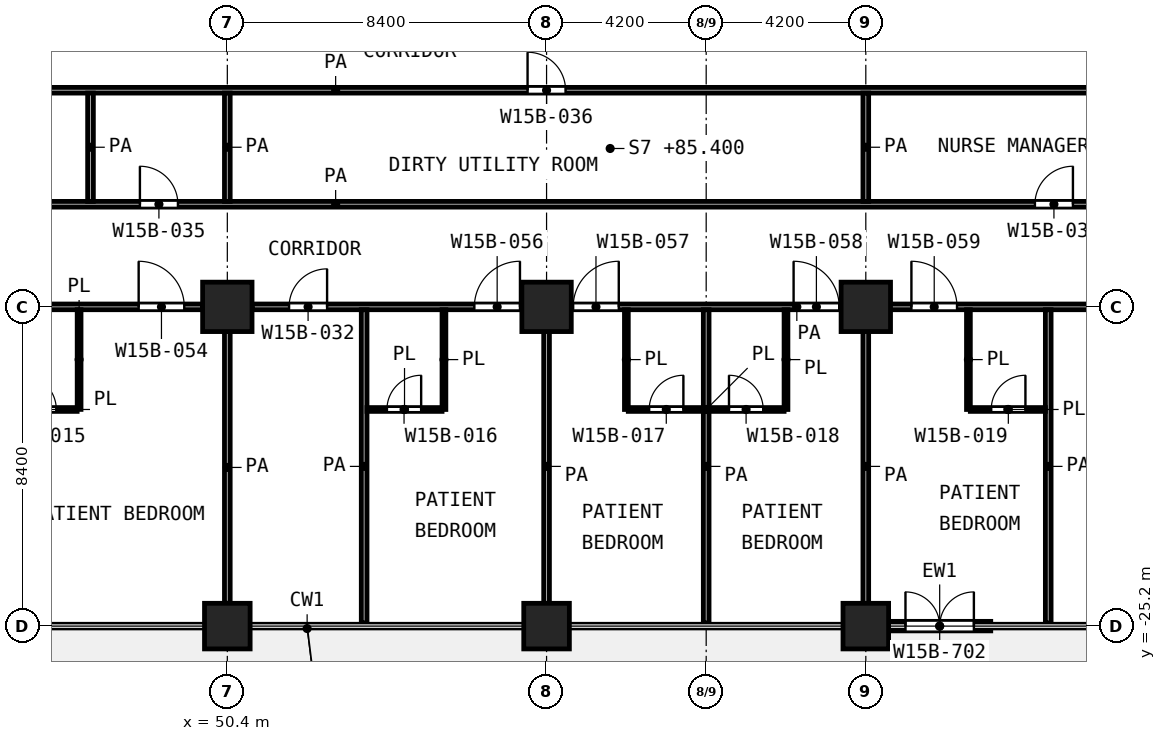
"""IFC4 building model, lengths in metres.
Left out: names, types, materials, properties, quantities, classifications, styles, units other than length and angle.
Written with IfcOpenShell. Run it as: python <this file> out.ifc"""

import sys

from ifc_helpers import new_model, si_unit, direction, frame, frame_2d, origin, origin_2d, place, context, subcontext, project, spatial, rectangle, extrude, element, fill, save


model = new_model("IFC4")
c1 = context("Model", 3, precision=1e-05, world=origin(), true_north=direction((0.0, 1.0)))
c2 = subcontext(c1, "Body", "Model", "MODEL_VIEW")
j1 = project(units=[si_unit("LENGTHUNIT", "METRE"), si_unit("PLANEANGLEUNIT", "RADIAN")], contexts=[c1])
p1 = place(None, origin())
s1 = spatial("IfcSite", under=j1, at=p1, CompositionType="ELEMENT")
p2 = place(p1, origin())
s2 = spatial("IfcBuilding", under=s1, at=p2, CompositionType="ELEMENT")
p3 = place(p2, frame((0.0, 0.0, 85.4)))
s3 = spatial("IfcBuildingStorey", under=s2, at=p3, CompositionType="ELEMENT", Elevation=85.4)
for number, where, z_axis, x_axis in (
    (1, (50.4, -16.8, 0.0), (0.0, 0.0, 1.0), (1.0, 0.0, 0.0)),
    (2, (58.8, -16.8, 0.0), (0.0, 0.0, 1.0), (1.0, 0.0, 0.0)),
    (3, (67.2, -16.8, 0.0), (0.0, 0.0, 1.0), (1.0, 0.0, 0.0)),
):
    element("IfcColumn", number, at=place(p3, frame(where, z_axis=z_axis, x_axis=x_axis)), inside=s3, PredefinedType="COLUMN", context=c2, shape_type="SweptSolid", body=[
        extrude(rectangle(XDim=1.3, YDim=1.3, at=origin_2d()), origin(), (0.0, 0.0, 1.0), 4.2),
    ])
for number, where, z_axis, x_axis in (
    (4, (50.4, -25.2, 0.0), (0.0, 0.0, 1.0), (1.0, 0.0, 0.0)),
    (5, (58.8, -25.2, 0.0), (0.0, 0.0, 1.0), (1.0, 0.0, 0.0)),
    (6, (67.2, -25.2, 0.0), (0.0, 0.0, 1.0), (1.0, 0.0, 0.0)),
):
    element("IfcColumn", number, at=place(p3, frame(where, z_axis=z_axis, x_axis=x_axis)), inside=s3, PredefinedType="COLUMN", context=c2, shape_type="SweptSolid", body=[
        extrude(rectangle(XDim=1.2, YDim=1.2, at=origin_2d()), origin(), (0.0, 0.0, 1.0), 4.2),
    ])
p4 = place(p3, frame((67.8, -25.2, 0.0), z_axis=(0.0, 0.0, 1.0), x_axis=(1.0, 0.0, 0.0)))
e7 = element("IfcWall", 7, at=p4, inside=s3, PredefinedType="SOLIDWALL", context=c2, shape_type="SweptSolid", body=[
    extrude(rectangle(XDim=2.688, YDim=0.25, at=frame_2d((1.344, 0.0))), origin(), (0.0, 0.0, 1.0), 3.78),
])
p5 = place(p4, frame((0.444, 0.0, 0.0)))
e8 = element("IfcOpeningElement", 8, at=p5, cuts=e7, PredefinedType="OPENING", context=c2, shape_type="SweptSolid", body=[
    extrude(rectangle(XDim=1.8, YDim=2.1, at=frame_2d((0.9, 1.05))), frame((0.0, 0.135, 0.0), z_axis=(0.0, -1.0, 0.0), x_axis=(1.0, 0.0, 0.0)), (0.0, 0.0, 1.0), 0.27),
])
p6 = place(p3, frame((44.452, -19.5, 0.0), z_axis=(0.0, 0.0, 1.0), x_axis=(1.0, 0.0, 0.0)))
e9 = element("IfcWall", 9, at=p6, inside=s3, PredefinedType="PARTITIONING", context=c2, shape_type="SweptSolid", body=[
    extrude(rectangle(XDim=1.996, YDim=0.1, at=frame_2d((0.998, 0.0))), origin(), (0.0, 0.0, 1.0), 3.9),
])
p7 = place(p6, frame((0.548, 0.0, 0.0)))
e10 = element("IfcOpeningElement", 10, at=p7, cuts=e9, PredefinedType="OPENING", context=c2, shape_type="SweptSolid", body=[
    extrude(rectangle(XDim=0.9, YDim=2.1, at=frame_2d((0.45, 1.05))), frame((0.0, 0.06, 0.0), z_axis=(0.0, -1.0, 0.0), x_axis=(1.0, 0.0, 0.0)), (0.0, 0.0, 1.0), 0.12),
])
p8 = place(p3, frame((54.075, -19.5, 0.0), z_axis=(0.0, 0.0, 1.0), x_axis=(1.0, 0.0, 0.0)))
e11 = element("IfcWall", 11, at=p8, inside=s3, PredefinedType="PARTITIONING", context=c2, shape_type="SweptSolid", body=[
    extrude(rectangle(XDim=1.975, YDim=0.1, at=frame_2d((0.988, 0.0))), origin(), (0.0, 0.0, 1.0), 3.9),
])
p9 = place(p8, frame((0.525, 0.0, 0.0)))
e12 = element("IfcOpeningElement", 12, at=p9, cuts=e11, PredefinedType="OPENING", context=c2, shape_type="SweptSolid", body=[
    extrude(rectangle(XDim=0.9, YDim=2.1, at=frame_2d((0.45, 1.05))), frame((0.0, 0.06, 0.0), z_axis=(0.0, -1.0, 0.0), x_axis=(1.0, 0.0, 0.0)), (0.0, 0.0, 1.0), 0.12),
])
p10 = place(p3, frame((60.95, -19.5, 0.0), z_axis=(0.0, 0.0, 1.0), x_axis=(1.0, 0.0, 0.0)))
e13 = element("IfcWall", 13, at=p10, inside=s3, PredefinedType="PARTITIONING", context=c2, shape_type="SweptSolid", body=[
    extrude(rectangle(XDim=4.1, YDim=0.1, at=frame_2d((2.05, 0.0))), origin(), (0.0, 0.0, 1.0), 3.9),
])
p11 = place(p10, frame((0.55, 0.0, 0.0)))
e14 = element("IfcOpeningElement", 14, at=p11, cuts=e13, PredefinedType="OPENING", context=c2, shape_type="SweptSolid", body=[
    extrude(rectangle(XDim=0.9, YDim=2.1, at=frame_2d((0.45, 1.05))), frame((0.0, 0.06, 0.0), z_axis=(0.0, -1.0, 0.0), x_axis=(1.0, 0.0, 0.0)), (0.0, 0.0, 1.0), 0.12),
])
p12 = place(p10, frame((2.65, 0.0, 0.0)))
e15 = element("IfcOpeningElement", 15, at=p12, cuts=e13, PredefinedType="OPENING", context=c2, shape_type="SweptSolid", body=[
    extrude(rectangle(XDim=0.9, YDim=2.1, at=frame_2d((0.45, 1.05))), frame((0.0, 0.06, 0.0), z_axis=(0.0, -1.0, 0.0), x_axis=(1.0, 0.0, 0.0)), (0.0, 0.0, 1.0), 0.12),
])
p13 = place(p3, frame((69.95, -19.5, 0.0), z_axis=(0.0, 0.0, 1.0), x_axis=(1.0, 0.0, 0.0)))
e16 = element("IfcWall", 16, at=p13, inside=s3, PredefinedType="PARTITIONING", context=c2, shape_type="SweptSolid", body=[
    extrude(rectangle(XDim=1.975, YDim=0.1, at=frame_2d((0.988, 0.0))), origin(), (0.0, 0.0, 1.0), 3.9),
])
p14 = place(p13, frame((0.55, 0.0, 0.0)))
e17 = element("IfcOpeningElement", 17, at=p14, cuts=e16, PredefinedType="OPENING", context=c2, shape_type="SweptSolid", body=[
    extrude(rectangle(XDim=0.9, YDim=2.1, at=frame_2d((0.45, 1.05))), frame((0.0, 0.06, 0.0), z_axis=(0.0, -1.0, 0.0), x_axis=(1.0, 0.0, 0.0)), (0.0, 0.0, 1.0), 0.12),
])
p15 = place(p3, frame((46.5, -19.498, 0.0), z_axis=(0.0, 0.0, 1.0), x_axis=(0.0, 1.0, 0.0)))
e18 = element("IfcWall", 18, at=p15, inside=s3, PredefinedType="PARTITIONING", context=c2, shape_type="SweptSolid", body=[
    extrude(rectangle(XDim=2.623, YDim=0.1, at=frame_2d((1.312, 0.0))), origin(), (0.0, 0.0, 1.0), 3.9),
])
for number, where, z_axis, x_axis in (
    (19, (56.1, -19.5, 0.0), (0.0, 0.0, 1.0), (0.0, 1.0, 0.0)),
    (20, (60.9, -19.5, 0.0), (0.0, 0.0, 1.0), (0.0, 1.0, 0.0)),
    (21, (65.1, -19.5, 0.0), (0.0, 0.0, 1.0), (0.0, 1.0, 0.0)),
    (22, (69.9, -19.5, 0.0), (0.0, 0.0, 1.0), (0.0, 1.0, 0.0)),
):
    element("IfcWall", number, at=place(p3, frame(where, z_axis=z_axis, x_axis=x_axis)), inside=s3, PredefinedType="PARTITIONING", context=c2, shape_type="SweptSolid", body=[
        extrude(rectangle(XDim=2.625, YDim=0.1, at=frame_2d((1.312, 0.0))), origin(), (0.0, 0.0, 1.0), 3.9),
    ])
p16 = place(p3, frame((25.1, -16.8, 0.0), z_axis=(0.0, 0.0, 1.0), x_axis=(1.0, 0.0, 0.0)))
e23 = element("IfcWall", 23, at=p16, inside=s3, PredefinedType="PARTITIONING", context=c2, shape_type="SweptSolid", body=[
    extrude(rectangle(XDim=24.65, YDim=0.15, at=frame_2d((12.325, 0.0))), origin(), (0.0, 0.0, 1.0), 3.9),
])
p17 = place(p16, frame((1.45, 0.0, 0.0)))
e24 = element("IfcOpeningElement", 24, at=p17, cuts=e23, PredefinedType="OPENING", context=c2, shape_type="SweptSolid", body=[
    extrude(rectangle(XDim=1.5, YDim=2.1, at=frame_2d((0.75, 1.05))), frame((0.0, 0.085, 0.0), z_axis=(0.0, -1.0, 0.0), x_axis=(1.0, 0.0, 0.0)), (0.0, 0.0, 1.0), 0.17),
])
p18 = place(p16, frame((9.25, 0.0, 0.0)))
e25 = element("IfcOpeningElement", 25, at=p18, cuts=e23, PredefinedType="OPENING", context=c2, shape_type="SweptSolid", body=[
    extrude(rectangle(XDim=1.5, YDim=2.1, at=frame_2d((0.75, 1.05))), frame((0.0, 0.085, 0.0), z_axis=(0.0, -1.0, 0.0), x_axis=(1.0, 0.0, 0.0)), (0.0, 0.0, 1.0), 0.17),
])
p19 = place(p16, frame((15.0, 0.0, 0.0)))
e26 = element("IfcOpeningElement", 26, at=p19, cuts=e23, PredefinedType="OPENING", context=c2, shape_type="SweptSolid", body=[
    extrude(rectangle(XDim=1.2, YDim=2.1, at=frame_2d((0.6, 1.05))), frame((0.0, 0.085, 0.0), z_axis=(0.0, -1.0, 0.0), x_axis=(1.0, 0.0, 0.0)), (0.0, 0.0, 1.0), 0.17),
])
p20 = place(p16, frame((22.967, 0.0, 0.0)))
e27 = element("IfcOpeningElement", 27, at=p20, cuts=e23, PredefinedType="OPENING", context=c2, shape_type="SweptSolid", body=[
    extrude(rectangle(XDim=1.2, YDim=2.1, at=frame_2d((0.6, 1.05))), frame((0.0, 0.085, 0.0), z_axis=(0.0, -1.0, 0.0), x_axis=(1.0, 0.0, 0.0)), (0.0, 0.0, 1.0), 0.17),
])
p21 = place(p16, frame((17.6, 0.0, 0.0)))
e28 = element("IfcOpeningElement", 28, at=p21, cuts=e23, PredefinedType="OPENING", context=c2, shape_type="SweptSolid", body=[
    extrude(rectangle(XDim=1.2, YDim=2.1, at=frame_2d((0.6, 1.05))), frame((0.0, 0.085, 0.0), z_axis=(0.0, -1.0, 0.0), x_axis=(1.0, 0.0, 0.0)), (0.0, 0.0, 1.0), 0.17),
])
p22 = place(p3, frame((51.05, -16.8, 0.0), z_axis=(0.0, 0.0, 1.0), x_axis=(1.0, 0.0, 0.0)))
e29 = element("IfcWall", 29, at=p22, inside=s3, PredefinedType="PARTITIONING", context=c2, shape_type="SweptSolid", body=[
    extrude(rectangle(XDim=28.67, YDim=0.15, at=frame_2d((14.335, 0.0))), origin(), (0.0, 0.0, 1.0), 3.9),
])
p23 = place(p22, frame((0.975, 0.0, 0.0)))
e30 = element("IfcOpeningElement", 30, at=p23, cuts=e29, PredefinedType="OPENING", context=c2, shape_type="SweptSolid", body=[
    extrude(rectangle(XDim=1.0, YDim=2.1, at=frame_2d((0.5, 1.05))), frame((0.0, 0.085, 0.0), z_axis=(0.0, -1.0, 0.0), x_axis=(1.0, 0.0, 0.0)), (0.0, 0.0, 1.0), 0.17),
])
p24 = place(p22, frame((5.85, 0.0, 0.0)))
e31 = element("IfcOpeningElement", 31, at=p24, cuts=e29, PredefinedType="OPENING", context=c2, shape_type="SweptSolid", body=[
    extrude(rectangle(XDim=1.2, YDim=2.1, at=frame_2d((0.6, 1.05))), frame((0.0, 0.085, 0.0), z_axis=(0.0, -1.0, 0.0), x_axis=(1.0, 0.0, 0.0)), (0.0, 0.0, 1.0), 0.17),
])
p25 = place(p22, frame((8.45, 0.0, 0.0)))
e32 = element("IfcOpeningElement", 32, at=p25, cuts=e29, PredefinedType="OPENING", context=c2, shape_type="SweptSolid", body=[
    extrude(rectangle(XDim=1.2, YDim=2.1, at=frame_2d((0.6, 1.05))), frame((0.0, 0.085, 0.0), z_axis=(0.0, -1.0, 0.0), x_axis=(1.0, 0.0, 0.0)), (0.0, 0.0, 1.0), 0.17),
])
p26 = place(p22, frame((14.25, 0.0, 0.0)))
e33 = element("IfcOpeningElement", 33, at=p26, cuts=e29, PredefinedType="OPENING", context=c2, shape_type="SweptSolid", body=[
    extrude(rectangle(XDim=1.2, YDim=2.1, at=frame_2d((0.6, 1.05))), frame((0.0, 0.085, 0.0), z_axis=(0.0, -1.0, 0.0), x_axis=(1.0, 0.0, 0.0)), (0.0, 0.0, 1.0), 0.17),
])
p27 = place(p22, frame((17.35, 0.0, 0.0)))
e34 = element("IfcOpeningElement", 34, at=p27, cuts=e29, PredefinedType="OPENING", context=c2, shape_type="SweptSolid", body=[
    extrude(rectangle(XDim=1.2, YDim=2.1, at=frame_2d((0.6, 1.05))), frame((0.0, 0.085, 0.0), z_axis=(0.0, -1.0, 0.0), x_axis=(1.0, 0.0, 0.0)), (0.0, 0.0, 1.0), 0.17),
])
p28 = place(p22, frame((25.3, 0.0, 0.0)))
e35 = element("IfcOpeningElement", 35, at=p28, cuts=e29, PredefinedType="OPENING", context=c2, shape_type="SweptSolid", body=[
    extrude(rectangle(XDim=1.5, YDim=2.1, at=frame_2d((0.75, 1.05))), frame((0.0, 0.085, 0.0), z_axis=(0.0, -1.0, 0.0), x_axis=(1.0, 0.0, 0.0)), (0.0, 0.0, 1.0), 0.17),
])
p29 = place(p3, frame((29.475, -14.1, 0.0), z_axis=(0.0, 0.0, 1.0), x_axis=(1.0, 0.0, 0.0)))
e36 = element("IfcWall", 36, at=p29, inside=s3, PredefinedType="PARTITIONING", context=c2, shape_type="SweptSolid", body=[
    extrude(rectangle(XDim=47.55, YDim=0.15, at=frame_2d((23.775, 0.0))), origin(), (0.0, 0.0, 1.0), 3.9),
])
p30 = place(p29, frame((18.625, 0.0, 0.0)))
e37 = element("IfcOpeningElement", 37, at=p30, cuts=e36, PredefinedType="OPENING", context=c2, shape_type="SweptSolid", body=[
    extrude(rectangle(XDim=1.0, YDim=2.1, at=frame_2d((0.5, 1.05))), frame((0.0, 0.085, 0.0), z_axis=(0.0, -1.0, 0.0), x_axis=(1.0, 0.0, 0.0)), (0.0, 0.0, 1.0), 0.17),
])
p31 = place(p29, frame((42.175, 0.0, 0.0)))
e38 = element("IfcOpeningElement", 38, at=p31, cuts=e36, PredefinedType="OPENING", context=c2, shape_type="SweptSolid", body=[
    extrude(rectangle(XDim=1.0, YDim=2.1, at=frame_2d((0.5, 1.05))), frame((0.0, 0.085, 0.0), z_axis=(0.0, -1.0, 0.0), x_axis=(1.0, 0.0, 0.0)), (0.0, 0.0, 1.0), 0.17),
])
p32 = place(p3, frame((29.475, -11.1, 0.0), z_axis=(0.0, 0.0, 1.0), x_axis=(1.0, 0.0, 0.0)))
e39 = element("IfcWall", 39, at=p32, inside=s3, PredefinedType="PARTITIONING", context=c2, shape_type="SweptSolid", body=[
    extrude(rectangle(XDim=47.55, YDim=0.15, at=frame_2d((23.775, 0.0))), origin(), (0.0, 0.0, 1.0), 3.9),
])
p33 = place(p32, frame((3.525, 0.0, 0.0)))
e40 = element("IfcOpeningElement", 40, at=p33, cuts=e39, PredefinedType="OPENING", context=c2, shape_type="SweptSolid", body=[
    extrude(rectangle(XDim=1.2, YDim=2.1, at=frame_2d((0.6, 1.05))), frame((0.0, 0.085, 0.0), z_axis=(0.0, -1.0, 0.0), x_axis=(1.0, 0.0, 0.0)), (0.0, 0.0, 1.0), 0.17),
])
p34 = place(p32, frame((9.925, 0.0, 0.0)))
e41 = element("IfcOpeningElement", 41, at=p34, cuts=e39, PredefinedType="OPENING", context=c2, shape_type="SweptSolid", body=[
    extrude(rectangle(XDim=1.0, YDim=2.1, at=frame_2d((0.5, 1.05))), frame((0.0, 0.085, 0.0), z_axis=(0.0, -1.0, 0.0), x_axis=(1.0, 0.0, 0.0)), (0.0, 0.0, 1.0), 0.17),
])
p35 = place(p32, frame((14.425, 0.0, 0.0)))
e42 = element("IfcOpeningElement", 42, at=p35, cuts=e39, PredefinedType="OPENING", context=c2, shape_type="SweptSolid", body=[
    extrude(rectangle(XDim=1.0, YDim=2.1, at=frame_2d((0.5, 1.05))), frame((0.0, 0.085, 0.0), z_axis=(0.0, -1.0, 0.0), x_axis=(1.0, 0.0, 0.0)), (0.0, 0.0, 1.0), 0.17),
])
p36 = place(p32, frame((28.825, 0.0, 0.0)))
e43 = element("IfcOpeningElement", 43, at=p36, cuts=e39, PredefinedType="OPENING", context=c2, shape_type="SweptSolid", body=[
    extrude(rectangle(XDim=1.0, YDim=2.1, at=frame_2d((0.5, 1.05))), frame((0.0, 0.085, 0.0), z_axis=(0.0, -1.0, 0.0), x_axis=(1.0, 0.0, 0.0)), (0.0, 0.0, 1.0), 0.17),
])
p37 = place(p3, frame((46.8, -14.025, 0.0), z_axis=(0.0, 0.0, 1.0), x_axis=(0.0, 1.0, 0.0)))
e44 = element("IfcWall", 44, at=p37, inside=s3, PredefinedType="PARTITIONING", context=c2, shape_type="SweptSolid", body=[
    extrude(rectangle(XDim=2.85, YDim=0.15, at=frame_2d((1.425, 0.0))), origin(), (0.0, 0.0, 1.0), 3.9),
])
p38 = place(p3, frame((50.4, -24.6, 0.0), z_axis=(0.0, 0.0, 1.0), x_axis=(0.0, 1.0, 0.0)))
e45 = element("IfcWall", 45, at=p38, inside=s3, PredefinedType="PARTITIONING", context=c2, shape_type="SweptSolid", body=[
    extrude(rectangle(XDim=7.15, YDim=0.15, at=frame_2d((3.575, 0.0))), origin(), (0.0, 0.0, 1.0), 3.9),
])
p39 = place(p3, frame((50.4, -14.025, 0.0), z_axis=(0.0, 0.0, 1.0), x_axis=(0.0, 1.0, 0.0)))
e46 = element("IfcWall", 46, at=p39, inside=s3, PredefinedType="PARTITIONING", context=c2, shape_type="SweptSolid", body=[
    extrude(rectangle(XDim=2.85, YDim=0.15, at=frame_2d((1.425, 0.0))), origin(), (0.0, 0.0, 1.0), 3.9),
])
for number, where, z_axis, x_axis in (
    (47, (54.0, -25.12, 0.0), (0.0, 0.0, 1.0), (0.0, 1.0, 0.0)),
    (48, (58.8, -25.12, 0.0), (0.0, 0.0, 1.0), (0.0, 1.0, 0.0)),
    (49, (63.0, -25.12, 0.0), (0.0, 0.0, 1.0), (0.0, 1.0, 0.0)),
    (50, (67.2, -25.12, 0.0), (0.0, 0.0, 1.0), (0.0, 1.0, 0.0)),
):
    element("IfcWall", number, at=place(p3, frame(where, z_axis=z_axis, x_axis=x_axis)), inside=s3, PredefinedType="PARTITIONING", context=c2, shape_type="SweptSolid", body=[
        extrude(rectangle(XDim=8.245, YDim=0.15, at=frame_2d((4.123, 0.0))), origin(), (0.0, 0.0, 1.0), 3.9),
    ])
p40 = place(p3, frame((67.2, -14.025, 0.0), z_axis=(0.0, 0.0, 1.0), x_axis=(0.0, 1.0, 0.0)))
e51 = element("IfcWall", 51, at=p40, inside=s3, PredefinedType="PARTITIONING", context=c2, shape_type="SweptSolid", body=[
    extrude(rectangle(XDim=2.85, YDim=0.15, at=frame_2d((1.425, 0.0))), origin(), (0.0, 0.0, 1.0), 3.9),
])
p41 = place(p3, frame((72.0, -25.12, 0.0), z_axis=(0.0, 0.0, 1.0), x_axis=(0.0, 1.0, 0.0)))
e52 = element("IfcWall", 52, at=p41, inside=s3, PredefinedType="PARTITIONING", context=c2, shape_type="SweptSolid", body=[
    extrude(rectangle(XDim=8.245, YDim=0.15, at=frame_2d((4.123, 0.0))), origin(), (0.0, 0.0, 1.0), 3.9),
])
p42 = place(p5, origin())
e53 = element("IfcDoor", 53, at=p42, inside=s3, OperationType="DOUBLE_DOOR_SINGLE_SWING", PredefinedType="DOOR", context=c2, shape_type="SweptSolid", body=[
    extrude(rectangle(XDim=1.8, YDim=2.1, at=frame_2d((0.9, 1.05))), frame((0.0, 0.025, 0.0), z_axis=(0.0, -1.0, 0.0), x_axis=(1.0, 0.0, 0.0)), (0.0, 0.0, 1.0), 0.05),
])
fill(e8, e53)
p43 = place(p30, origin())
e54 = element("IfcDoor", 54, at=p43, inside=s3, OperationType="SINGLE_SWING_LEFT", PredefinedType="DOOR", context=c2, shape_type="SweptSolid", body=[
    extrude(rectangle(XDim=1.0, YDim=2.1, at=frame_2d((0.5, 1.05))), frame((0.0, 0.025, 0.0), z_axis=(0.0, -1.0, 0.0), x_axis=(1.0, 0.0, 0.0)), (0.0, 0.0, 1.0), 0.05),
])
fill(e37, e54)
p44 = place(p36, origin())
e55 = element("IfcDoor", 55, at=p44, inside=s3, OperationType="SINGLE_SWING_LEFT", PredefinedType="DOOR", context=c2, shape_type="SweptSolid", body=[
    extrude(rectangle(XDim=1.0, YDim=2.1, at=frame_2d((0.5, 1.05))), frame((0.0, 0.025, 0.0), z_axis=(0.0, -1.0, 0.0), x_axis=(1.0, 0.0, 0.0)), (0.0, 0.0, 1.0), 0.05),
])
fill(e43, e55)
p45 = place(p31, origin())
e56 = element("IfcDoor", 56, at=p45, inside=s3, OperationType="SINGLE_SWING_RIGHT", PredefinedType="DOOR", context=c2, shape_type="SweptSolid", body=[
    extrude(rectangle(XDim=1.0, YDim=2.1, at=frame_2d((0.5, 1.05))), frame((0.0, 0.025, 0.0), z_axis=(0.0, -1.0, 0.0), x_axis=(1.0, 0.0, 0.0)), (0.0, 0.0, 1.0), 0.05),
])
fill(e38, e56)
p46 = place(p20, origin())
e57 = element("IfcDoor", 57, at=p46, inside=s3, OperationType="SINGLE_SWING_LEFT", PredefinedType="DOOR", context=c2, shape_type="SweptSolid", body=[
    extrude(rectangle(XDim=1.2, YDim=2.1, at=frame_2d((0.6, 1.05))), frame((0.0, 0.025, 0.0), z_axis=(0.0, -1.0, 0.0), x_axis=(1.0, 0.0, 0.0)), (0.0, 0.0, 1.0), 0.05),
])
fill(e27, e57)
p47 = place(p7, origin())
e58 = element("IfcDoor", 58, at=p47, inside=s3, OperationType="SINGLE_SWING_LEFT", PredefinedType="DOOR", context=c2, shape_type="SweptSolid", body=[
    extrude(rectangle(XDim=0.9, YDim=2.1, at=frame_2d((0.45, 1.05))), frame((0.0, 0.025, 0.0), z_axis=(0.0, -1.0, 0.0), x_axis=(1.0, 0.0, 0.0)), (0.0, 0.0, 1.0), 0.05),
])
fill(e10, e58)
p48 = place(p23, origin())
e59 = element("IfcDoor", 59, at=p48, inside=s3, OperationType="SINGLE_SWING_RIGHT", PredefinedType="DOOR", context=c2, shape_type="SweptSolid", body=[
    extrude(rectangle(XDim=1.0, YDim=2.1, at=frame_2d((0.5, 1.05))), frame((0.0, 0.025, 0.0), z_axis=(0.0, -1.0, 0.0), x_axis=(1.0, 0.0, 0.0)), (0.0, 0.0, 1.0), 0.05),
])
fill(e30, e59)
p49 = place(p24, origin())
e60 = element("IfcDoor", 60, at=p49, inside=s3, OperationType="SINGLE_SWING_RIGHT", PredefinedType="DOOR", context=c2, shape_type="SweptSolid", body=[
    extrude(rectangle(XDim=1.2, YDim=2.1, at=frame_2d((0.6, 1.05))), frame((0.0, 0.025, 0.0), z_axis=(0.0, -1.0, 0.0), x_axis=(1.0, 0.0, 0.0)), (0.0, 0.0, 1.0), 0.05),
])
fill(e31, e60)
p50 = place(p9, origin())
e61 = element("IfcDoor", 61, at=p50, inside=s3, OperationType="SINGLE_SWING_RIGHT", PredefinedType="DOOR", context=c2, shape_type="SweptSolid", body=[
    extrude(rectangle(XDim=0.9, YDim=2.1, at=frame_2d((0.45, 1.05))), frame((0.0, 0.025, 0.0), z_axis=(0.0, -1.0, 0.0), x_axis=(1.0, 0.0, 0.0)), (0.0, 0.0, 1.0), 0.05),
])
fill(e12, e61)
p51 = place(p25, origin())
e62 = element("IfcDoor", 62, at=p51, inside=s3, OperationType="SINGLE_SWING_RIGHT", PredefinedType="DOOR", context=c2, shape_type="SweptSolid", body=[
    extrude(rectangle(XDim=1.2, YDim=2.1, at=frame_2d((0.6, 1.05))), frame((0.0, 0.025, 0.0), z_axis=(0.0, -1.0, 0.0), x_axis=(1.0, 0.0, 0.0)), (0.0, 0.0, 1.0), 0.05),
])
fill(e32, e62)
p52 = place(p11, origin())
e63 = element("IfcDoor", 63, at=p52, inside=s3, OperationType="SINGLE_SWING_RIGHT", PredefinedType="DOOR", context=c2, shape_type="SweptSolid", body=[
    extrude(rectangle(XDim=0.9, YDim=2.1, at=frame_2d((0.45, 1.05))), frame((0.0, 0.025, 0.0), z_axis=(0.0, -1.0, 0.0), x_axis=(1.0, 0.0, 0.0)), (0.0, 0.0, 1.0), 0.05),
])
fill(e14, e63)
p53 = place(p26, origin())
e64 = element("IfcDoor", 64, at=p53, inside=s3, OperationType="SINGLE_SWING_LEFT", PredefinedType="DOOR", context=c2, shape_type="SweptSolid", body=[
    extrude(rectangle(XDim=1.2, YDim=2.1, at=frame_2d((0.6, 1.05))), frame((0.0, 0.025, 0.0), z_axis=(0.0, -1.0, 0.0), x_axis=(1.0, 0.0, 0.0)), (0.0, 0.0, 1.0), 0.05),
])
fill(e33, e64)
p54 = place(p12, origin())
e65 = element("IfcDoor", 65, at=p54, inside=s3, OperationType="SINGLE_SWING_LEFT", PredefinedType="DOOR", context=c2, shape_type="SweptSolid", body=[
    extrude(rectangle(XDim=0.9, YDim=2.1, at=frame_2d((0.45, 1.05))), frame((0.0, 0.025, 0.0), z_axis=(0.0, -1.0, 0.0), x_axis=(1.0, 0.0, 0.0)), (0.0, 0.0, 1.0), 0.05),
])
fill(e15, e65)
p55 = place(p27, origin())
e66 = element("IfcDoor", 66, at=p55, inside=s3, OperationType="SINGLE_SWING_LEFT", PredefinedType="DOOR", context=c2, shape_type="SweptSolid", body=[
    extrude(rectangle(XDim=1.2, YDim=2.1, at=frame_2d((0.6, 1.05))), frame((0.0, 0.025, 0.0), z_axis=(0.0, -1.0, 0.0), x_axis=(1.0, 0.0, 0.0)), (0.0, 0.0, 1.0), 0.05),
])
fill(e34, e66)
p56 = place(p14, origin())
e67 = element("IfcDoor", 67, at=p56, inside=s3, OperationType="SINGLE_SWING_RIGHT", PredefinedType="DOOR", context=c2, shape_type="SweptSolid", body=[
    extrude(rectangle(XDim=0.9, YDim=2.1, at=frame_2d((0.45, 1.05))), frame((0.0, 0.025, 0.0), z_axis=(0.0, -1.0, 0.0), x_axis=(1.0, 0.0, 0.0)), (0.0, 0.0, 1.0), 0.05),
])
fill(e17, e67)
save(model, sys.argv[1])
